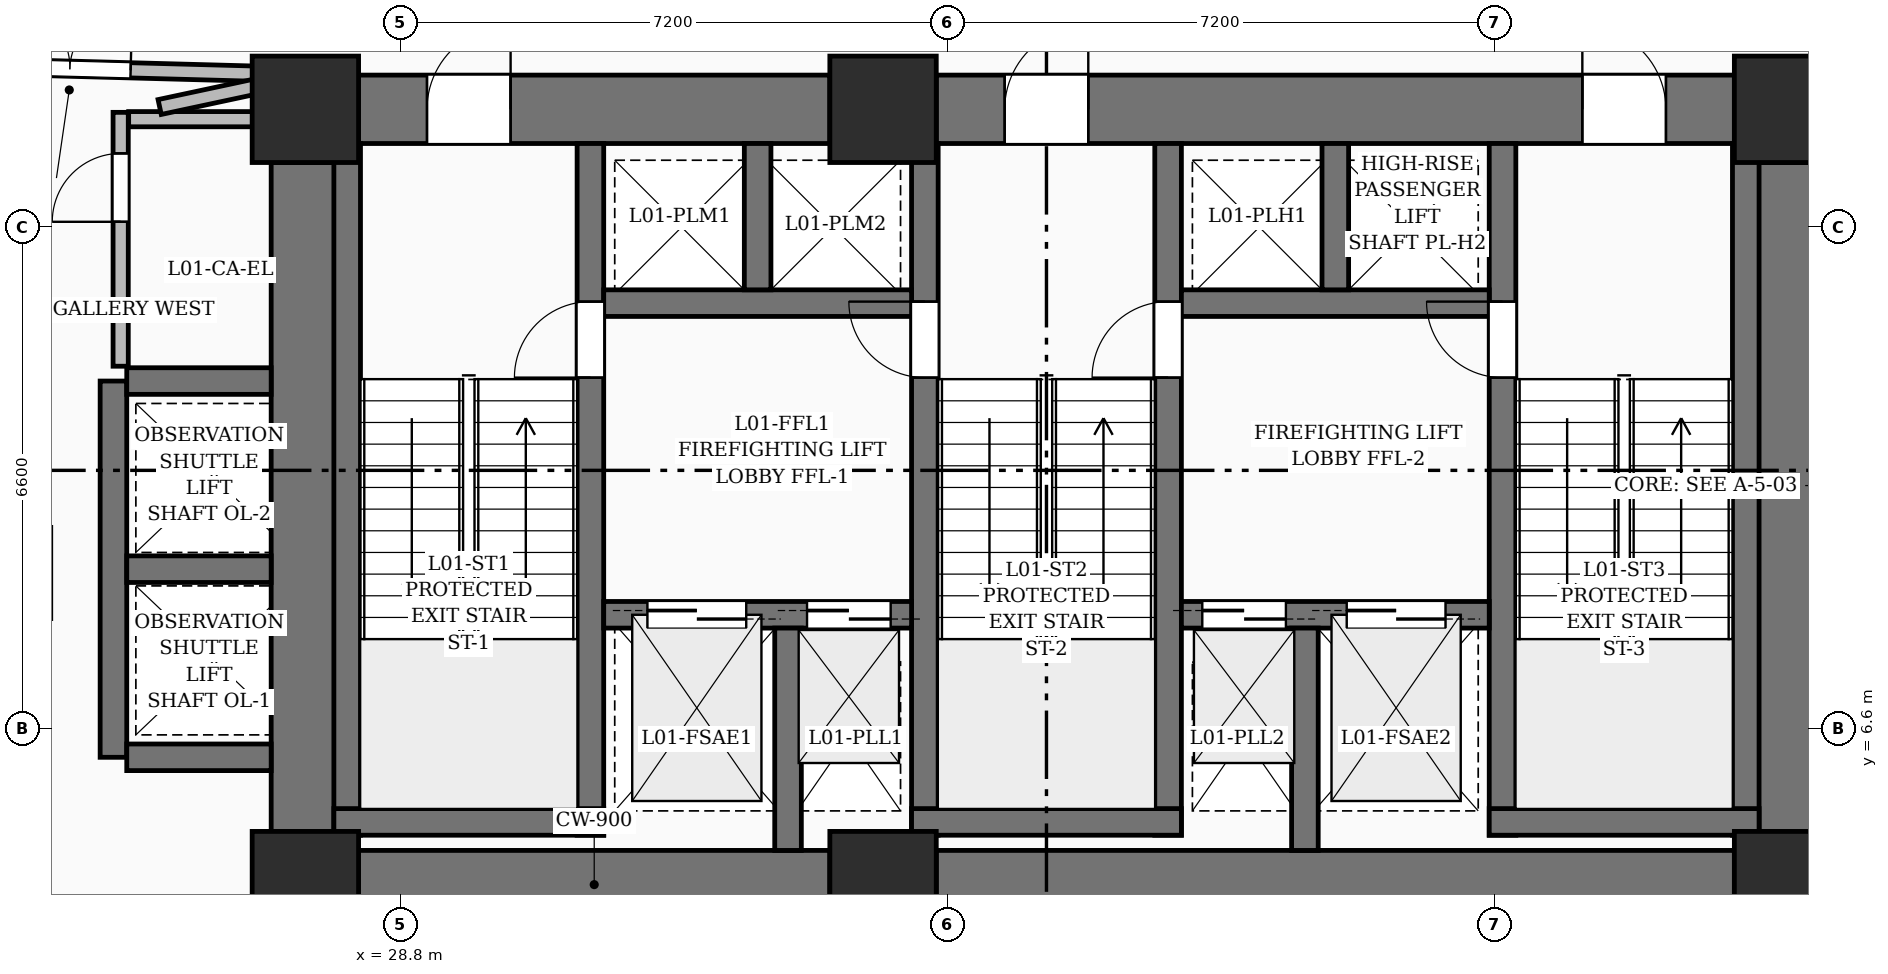
"""IFC4 building model, lengths in metres.
Left out: names, types, materials, properties, quantities, classifications, styles, units other than length and angle.
Written with IfcOpenShell. Run it as: python <this file> out.ifc"""

import sys

from ifc_helpers import new_model, si_unit, direction, frame, frame_2d, origin, origin_2d, place, context, subcontext, project, spatial, rectangle, extrude, element, fill, save


model = new_model("IFC4")
c1 = context("Model", 3, precision=1e-05, world=origin(), true_north=direction((0.0, 1.0)))
c2 = subcontext(c1, "Body", "Model", "MODEL_VIEW")
j1 = project(units=[si_unit("LENGTHUNIT", "METRE"), si_unit("PLANEANGLEUNIT", "RADIAN")], contexts=[c1])
p1 = place(None, origin())
s1 = spatial("IfcSite", under=j1, at=p1, CompositionType="ELEMENT")
p2 = place(p1, origin())
s2 = spatial("IfcBuilding", under=s1, at=p2, CompositionType="ELEMENT")
p3 = place(p2, frame((0.0, 0.0, 8.4)))
s3 = spatial("IfcBuildingStorey", under=s2, at=p3, CompositionType="ELEMENT", Elevation=8.4)
for number, where, z_axis, x_axis in (
    (1, (27.55, 4.55, 0.0), (0.0, 0.0, 1.0), (1.0, 0.0, 0.0)),
    (2, (35.15, 4.55, 0.0), (0.0, 0.0, 1.0), (1.0, 0.0, 0.0)),
    (3, (47.05, 4.55, 0.0), (0.0, 0.0, 1.0), (1.0, 0.0, 0.0)),
    (4, (27.55, 14.75, 0.0), (0.0, 0.0, 1.0), (1.0, 0.0, 0.0)),
    (5, (35.15, 14.75, 0.0), (0.0, 0.0, 1.0), (1.0, 0.0, 0.0)),
    (6, (47.05, 14.75, 0.0), (0.0, 0.0, 1.0), (1.0, 0.0, 0.0)),
):
    element("IfcColumn", number, at=place(p3, frame(where, z_axis=z_axis, x_axis=x_axis)), inside=s3, PredefinedType="COLUMN", context=c2, shape_type="SweptSolid", body=[
        extrude(rectangle(XDim=1.4, YDim=1.4, at=origin_2d()), origin(), (0.0, 0.0, 1.0), 4.5),
    ])
p4 = place(p3, frame((28.25, 4.55, 0.0), z_axis=(0.0, 0.0, 1.0), x_axis=(1.0, 0.0, 0.0)))
e7 = element("IfcWall", 7, at=p4, inside=s3, PredefinedType="SHEAR", context=c2, shape_type="SweptSolid", body=[
    extrude(rectangle(XDim=6.2, YDim=0.9, at=frame_2d((3.1, 0.0))), origin(), (0.0, 0.0, 1.0), 4.5),
])
p5 = place(p3, frame((35.85, 4.55, 0.0), z_axis=(0.0, 0.0, 1.0), x_axis=(1.0, 0.0, 0.0)))
e8 = element("IfcWall", 8, at=p5, inside=s3, PredefinedType="SHEAR", context=c2, shape_type="SweptSolid", body=[
    extrude(rectangle(XDim=10.5, YDim=0.9, at=frame_2d((5.25, 0.0))), origin(), (0.0, 0.0, 1.0), 4.5),
])
p6 = place(p3, frame((28.25, 14.75, 0.0), z_axis=(0.0, 0.0, 1.0), x_axis=(1.0, 0.0, 0.0)))
e9 = element("IfcWall", 9, at=p6, inside=s3, PredefinedType="SHEAR", context=c2, shape_type="SweptSolid", body=[
    extrude(rectangle(XDim=6.2, YDim=0.9, at=frame_2d((3.1, 0.0))), origin(), (0.0, 0.0, 1.0), 4.5),
])
p7 = place(p6, frame((0.9, 0.0, 0.0)))
e10 = element("IfcOpeningElement", 10, at=p7, cuts=e9, PredefinedType="OPENING", context=c2, shape_type="SweptSolid", body=[
    extrude(rectangle(XDim=1.1, YDim=2.2, at=frame_2d((0.55, 1.1))), frame((0.0, 0.46, 0.0), z_axis=(0.0, -1.0, 0.0), x_axis=(1.0, 0.0, 0.0)), (0.0, 0.0, 1.0), 0.92),
])
p8 = place(p3, frame((35.85, 14.75, 0.0), z_axis=(0.0, 0.0, 1.0), x_axis=(1.0, 0.0, 0.0)))
e11 = element("IfcWall", 11, at=p8, inside=s3, PredefinedType="SHEAR", context=c2, shape_type="SweptSolid", body=[
    extrude(rectangle(XDim=10.5, YDim=0.9, at=frame_2d((5.25, 0.0))), origin(), (0.0, 0.0, 1.0), 4.5),
])
p9 = place(p8, frame((0.9, 0.0, 0.0)))
e12 = element("IfcOpeningElement", 12, at=p9, cuts=e11, PredefinedType="OPENING", context=c2, shape_type="SweptSolid", body=[
    extrude(rectangle(XDim=1.1, YDim=2.2, at=frame_2d((0.55, 1.1))), frame((0.0, 0.46, 0.0), z_axis=(0.0, -1.0, 0.0), x_axis=(1.0, 0.0, 0.0)), (0.0, 0.0, 1.0), 0.92),
])
p10 = place(p8, frame((8.5, 0.0, 0.0)))
e13 = element("IfcOpeningElement", 13, at=p10, cuts=e11, PredefinedType="OPENING", context=c2, shape_type="SweptSolid", body=[
    extrude(rectangle(XDim=1.1, YDim=2.2, at=frame_2d((0.55, 1.1))), frame((0.0, 0.46, 0.0), z_axis=(0.0, -1.0, 0.0), x_axis=(1.0, 0.0, 0.0)), (0.0, 0.0, 1.0), 0.92),
])
for number, where, z_axis, x_axis in (
    (14, (27.55, 5.25, 0.0), (0.0, 0.0, 1.0), (0.0, 1.0, 0.0)),
    (15, (47.05, 5.25, 0.0), (0.0, 0.0, 1.0), (0.0, 1.0, 0.0)),
):
    element("IfcWall", number, at=place(p3, frame(where, z_axis=z_axis, x_axis=x_axis)), inside=s3, PredefinedType="SHEAR", context=c2, shape_type="SweptSolid", body=[
        extrude(rectangle(XDim=8.8, YDim=0.9, at=frame_2d((4.4, 0.0))), origin(), (0.0, 0.0, 1.0), 4.5),
    ])
p11 = place(p3, frame((28.1, 5.2, 0.0), z_axis=(0.0, 0.0, 1.0), x_axis=(0.0, 1.0, 0.0)))
e16 = element("IfcWall", 16, at=p11, inside=s3, PredefinedType="SOLIDWALL", context=c2, shape_type="SweptSolid", body=[
    extrude(rectangle(XDim=9.1, YDim=0.35, at=frame_2d((4.55, 0.0))), origin(), (0.0, 0.0, 1.0), 4.5),
])
p12 = place(p3, frame((31.3, 5.2, 0.0), z_axis=(0.0, 0.0, 1.0), x_axis=(0.0, 1.0, 0.0)))
e17 = element("IfcWall", 17, at=p12, inside=s3, PredefinedType="SOLIDWALL", context=c2, shape_type="SweptSolid", body=[
    extrude(rectangle(XDim=9.1, YDim=0.35, at=frame_2d((4.55, 0.0))), origin(), (0.0, 0.0, 1.0), 4.5),
])
p13 = place(p12, frame((6.02, 0.0, 0.0)))
e18 = element("IfcOpeningElement", 18, at=p13, cuts=e17, PredefinedType="OPENING", context=c2, shape_type="SweptSolid", body=[
    extrude(rectangle(XDim=1.0, YDim=2.15, at=frame_2d((0.5, 1.075))), frame((0.0, 0.185, 0.0), z_axis=(0.0, -1.0, 0.0), x_axis=(1.0, 0.0, 0.0)), (0.0, 0.0, 1.0), 0.37),
])
p14 = place(p3, frame((27.925, 5.375, 0.0), z_axis=(0.0, 0.0, 1.0), x_axis=(1.0, 0.0, 0.0)))
e19 = element("IfcWall", 19, at=p14, inside=s3, PredefinedType="SOLIDWALL", context=c2, shape_type="SweptSolid", body=[
    extrude(rectangle(XDim=3.55, YDim=0.35, at=frame_2d((1.775, 0.0))), origin(), (0.0, 0.0, 1.0), 4.5),
])
p15 = place(p3, frame((35.7, 5.2, 0.0), z_axis=(0.0, 0.0, 1.0), x_axis=(0.0, 1.0, 0.0)))
e20 = element("IfcWall", 20, at=p15, inside=s3, PredefinedType="SOLIDWALL", context=c2, shape_type="SweptSolid", body=[
    extrude(rectangle(XDim=9.1, YDim=0.35, at=frame_2d((4.55, 0.0))), origin(), (0.0, 0.0, 1.0), 4.5),
])
p16 = place(p15, frame((6.02, 0.0, 0.0)))
e21 = element("IfcOpeningElement", 21, at=p16, cuts=e20, PredefinedType="OPENING", context=c2, shape_type="SweptSolid", body=[
    extrude(rectangle(XDim=1.0, YDim=2.15, at=frame_2d((0.5, 1.075))), frame((0.0, 0.185, 0.0), z_axis=(0.0, -1.0, 0.0), x_axis=(1.0, 0.0, 0.0)), (0.0, 0.0, 1.0), 0.37),
])
p17 = place(p3, frame((38.9, 5.2, 0.0), z_axis=(0.0, 0.0, 1.0), x_axis=(0.0, 1.0, 0.0)))
e22 = element("IfcWall", 22, at=p17, inside=s3, PredefinedType="SOLIDWALL", context=c2, shape_type="SweptSolid", body=[
    extrude(rectangle(XDim=9.1, YDim=0.35, at=frame_2d((4.55, 0.0))), origin(), (0.0, 0.0, 1.0), 4.5),
])
p18 = place(p17, frame((6.02, 0.0, 0.0)))
e23 = element("IfcOpeningElement", 23, at=p18, cuts=e22, PredefinedType="OPENING", context=c2, shape_type="SweptSolid", body=[
    extrude(rectangle(XDim=1.0, YDim=2.15, at=frame_2d((0.5, 1.075))), frame((0.0, 0.185, 0.0), z_axis=(0.0, -1.0, 0.0), x_axis=(1.0, 0.0, 0.0)), (0.0, 0.0, 1.0), 0.37),
])
p19 = place(p3, frame((35.525, 5.375, 0.0), z_axis=(0.0, 0.0, 1.0), x_axis=(1.0, 0.0, 0.0)))
e24 = element("IfcWall", 24, at=p19, inside=s3, PredefinedType="SOLIDWALL", context=c2, shape_type="SweptSolid", body=[
    extrude(rectangle(XDim=3.55, YDim=0.35, at=frame_2d((1.775, 0.0))), origin(), (0.0, 0.0, 1.0), 4.5),
])
p20 = place(p3, frame((43.3, 5.2, 0.0), z_axis=(0.0, 0.0, 1.0), x_axis=(0.0, 1.0, 0.0)))
e25 = element("IfcWall", 25, at=p20, inside=s3, PredefinedType="SOLIDWALL", context=c2, shape_type="SweptSolid", body=[
    extrude(rectangle(XDim=9.1, YDim=0.35, at=frame_2d((4.55, 0.0))), origin(), (0.0, 0.0, 1.0), 4.5),
])
p21 = place(p20, frame((6.02, 0.0, 0.0)))
e26 = element("IfcOpeningElement", 26, at=p21, cuts=e25, PredefinedType="OPENING", context=c2, shape_type="SweptSolid", body=[
    extrude(rectangle(XDim=1.0, YDim=2.15, at=frame_2d((0.5, 1.075))), frame((0.0, 0.185, 0.0), z_axis=(0.0, -1.0, 0.0), x_axis=(1.0, 0.0, 0.0)), (0.0, 0.0, 1.0), 0.37),
])
p22 = place(p3, frame((46.5, 5.2, 0.0), z_axis=(0.0, 0.0, 1.0), x_axis=(0.0, 1.0, 0.0)))
e27 = element("IfcWall", 27, at=p22, inside=s3, PredefinedType="SOLIDWALL", context=c2, shape_type="SweptSolid", body=[
    extrude(rectangle(XDim=9.1, YDim=0.35, at=frame_2d((4.55, 0.0))), origin(), (0.0, 0.0, 1.0), 4.5),
])
p23 = place(p3, frame((43.125, 5.375, 0.0), z_axis=(0.0, 0.0, 1.0), x_axis=(1.0, 0.0, 0.0)))
e28 = element("IfcWall", 28, at=p23, inside=s3, PredefinedType="SOLIDWALL", context=c2, shape_type="SweptSolid", body=[
    extrude(rectangle(XDim=3.55, YDim=0.35, at=frame_2d((1.775, 0.0))), origin(), (0.0, 0.0, 1.0), 4.5),
])
p24 = place(p3, frame((31.475, 8.1, 0.0), z_axis=(0.0, 0.0, 1.0), x_axis=(1.0, 0.0, 0.0)))
e29 = element("IfcWall", 29, at=p24, inside=s3, PredefinedType="SOLIDWALL", context=c2, shape_type="SweptSolid", body=[
    extrude(rectangle(XDim=4.05, YDim=0.35, at=frame_2d((2.025, 0.0))), origin(), (0.0, 0.0, 1.0), 4.5),
])
p25 = place(p24, frame((0.575, 0.0, 0.0)))
e30 = element("IfcOpeningElement", 30, at=p25, cuts=e29, PredefinedType="OPENING", context=c2, shape_type="SweptSolid", body=[
    extrude(rectangle(XDim=1.3, YDim=2.25, at=frame_2d((0.65, 1.125))), frame((0.0, 0.185, 0.0), z_axis=(0.0, -1.0, 0.0), x_axis=(1.0, 0.0, 0.0)), (0.0, 0.0, 1.0), 0.37),
])
p26 = place(p24, frame((2.675, 0.0, 0.0)))
e31 = element("IfcOpeningElement", 31, at=p26, cuts=e29, PredefinedType="OPENING", context=c2, shape_type="SweptSolid", body=[
    extrude(rectangle(XDim=1.1, YDim=2.2, at=frame_2d((0.55, 1.1))), frame((0.0, 0.185, 0.0), z_axis=(0.0, -1.0, 0.0), x_axis=(1.0, 0.0, 0.0)), (0.0, 0.0, 1.0), 0.37),
])
p27 = place(p3, frame((39.075, 8.1, 0.0), z_axis=(0.0, 0.0, 1.0), x_axis=(1.0, 0.0, 0.0)))
e32 = element("IfcWall", 32, at=p27, inside=s3, PredefinedType="SOLIDWALL", context=c2, shape_type="SweptSolid", body=[
    extrude(rectangle(XDim=4.05, YDim=0.35, at=frame_2d((2.025, 0.0))), origin(), (0.0, 0.0, 1.0), 4.5),
])
p28 = place(p27, frame((2.175, 0.0, 0.0)))
e33 = element("IfcOpeningElement", 33, at=p28, cuts=e32, PredefinedType="OPENING", context=c2, shape_type="SweptSolid", body=[
    extrude(rectangle(XDim=1.3, YDim=2.25, at=frame_2d((0.65, 1.125))), frame((0.0, 0.185, 0.0), z_axis=(0.0, -1.0, 0.0), x_axis=(1.0, 0.0, 0.0)), (0.0, 0.0, 1.0), 0.37),
])
p29 = place(p27, frame((0.275, 0.0, 0.0)))
e34 = element("IfcOpeningElement", 34, at=p29, cuts=e32, PredefinedType="OPENING", context=c2, shape_type="SweptSolid", body=[
    extrude(rectangle(XDim=1.1, YDim=2.2, at=frame_2d((0.55, 1.1))), frame((0.0, 0.185, 0.0), z_axis=(0.0, -1.0, 0.0), x_axis=(1.0, 0.0, 0.0)), (0.0, 0.0, 1.0), 0.37),
])
for number, where, z_axis, x_axis in (
    (35, (33.9, 5.0, 0.0), (0.0, 0.0, 1.0), (0.0, 1.0, 0.0)),
    (36, (40.7, 5.0, 0.0), (0.0, 0.0, 1.0), (0.0, 1.0, 0.0)),
):
    element("IfcWall", number, at=place(p3, frame(where, z_axis=z_axis, x_axis=x_axis)), inside=s3, PredefinedType="SOLIDWALL", context=c2, shape_type="SweptSolid", body=[
        extrude(rectangle(XDim=2.925, YDim=0.35, at=frame_2d((1.462, 0.0))), origin(), (0.0, 0.0, 1.0), 4.5),
    ])
p30 = place(p3, frame((31.475, 12.2, 0.0), z_axis=(0.0, 0.0, 1.0), x_axis=(1.0, 0.0, 0.0)))
e37 = element("IfcWall", 37, at=p30, inside=s3, PredefinedType="SOLIDWALL", context=c2, shape_type="SweptSolid", body=[
    extrude(rectangle(XDim=4.05, YDim=0.35, at=frame_2d((2.025, 0.0))), origin(), (0.0, 0.0, 1.0), 4.5),
])
p31 = place(p3, frame((33.5, 12.375, 0.0), z_axis=(0.0, 0.0, 1.0), x_axis=(0.0, 1.0, 0.0)))
e38 = element("IfcWall", 38, at=p31, inside=s3, PredefinedType="SOLIDWALL", context=c2, shape_type="SweptSolid", body=[
    extrude(rectangle(XDim=1.925, YDim=0.35, at=frame_2d((0.962, 0.0))), origin(), (0.0, 0.0, 1.0), 4.5),
])
p32 = place(p3, frame((39.075, 12.2, 0.0), z_axis=(0.0, 0.0, 1.0), x_axis=(1.0, 0.0, 0.0)))
e39 = element("IfcWall", 39, at=p32, inside=s3, PredefinedType="SOLIDWALL", context=c2, shape_type="SweptSolid", body=[
    extrude(rectangle(XDim=4.05, YDim=0.35, at=frame_2d((2.025, 0.0))), origin(), (0.0, 0.0, 1.0), 4.5),
])
p33 = place(p3, frame((41.1, 12.375, 0.0), z_axis=(0.0, 0.0, 1.0), x_axis=(0.0, 1.0, 0.0)))
e40 = element("IfcWall", 40, at=p33, inside=s3, PredefinedType="SOLIDWALL", context=c2, shape_type="SweptSolid", body=[
    extrude(rectangle(XDim=1.925, YDim=0.35, at=frame_2d((0.962, 0.0))), origin(), (0.0, 0.0, 1.0), 4.5),
])
p34 = place(p3, frame((25.025, 6.225, 0.0), z_axis=(0.0, 0.0, 1.0), x_axis=(0.0, 1.0, 0.0)))
e41 = element("IfcWall", 41, at=p34, inside=s3, PredefinedType="SOLIDWALL", context=c2, shape_type="SweptSolid", body=[
    extrude(rectangle(XDim=4.95, YDim=0.35, at=frame_2d((2.475, 0.0))), origin(), (0.0, 0.0, 1.0), 4.5),
])
for number, where, z_axis, x_axis in (
    (42, (25.2, 6.225, 0.0), (0.0, 0.0, 1.0), (1.0, 0.0, 0.0)),
    (43, (25.2, 8.7, 0.0), (0.0, 0.0, 1.0), (1.0, 0.0, 0.0)),
    (44, (25.2, 11.175, 0.0), (0.0, 0.0, 1.0), (1.0, 0.0, 0.0)),
):
    element("IfcWall", number, at=place(p3, frame(where, z_axis=z_axis, x_axis=x_axis)), inside=s3, PredefinedType="SOLIDWALL", context=c2, shape_type="SweptSolid", body=[
        extrude(rectangle(XDim=1.9, YDim=0.35, at=frame_2d((0.95, 0.0))), origin(), (0.0, 0.0, 1.0), 4.5),
    ])
p35 = place(p3, frame((25.12, 11.37, 0.0), z_axis=(0.0, 0.0, 1.0), x_axis=(0.0, 1.0, 0.0)))
e45 = element("IfcWall", 45, at=p35, inside=s3, PredefinedType="PARTITIONING", context=c2, shape_type="SweptSolid", body=[
    extrude(rectangle(XDim=3.34, YDim=0.2, at=frame_2d((1.67, 0.0))), origin(), (0.0, 0.0, 1.0), 4.2),
])
p36 = place(p35, frame((1.9, 0.0, 0.0)))
e46 = element("IfcOpeningElement", 46, at=p36, cuts=e45, PredefinedType="OPENING", context=c2, shape_type="SweptSolid", body=[
    extrude(rectangle(XDim=0.9, YDim=2.1, at=frame_2d((0.45, 1.05))), frame((0.0, 0.11, 0.0), z_axis=(0.0, -1.0, 0.0), x_axis=(1.0, 0.0, 0.0)), (0.0, 0.0, 1.0), 0.22),
])
p37 = place(p3, frame((25.225, 14.62, 0.0), z_axis=(0.0, 0.0, 1.0), x_axis=(1.0, 0.0, 0.0)))
e47 = element("IfcWall", 47, at=p37, inside=s3, PredefinedType="PARTITIONING", context=c2, shape_type="SweptSolid", body=[
    extrude(rectangle(XDim=1.86, YDim=0.2, at=frame_2d((0.93, 0.0))), origin(), (0.0, 0.0, 1.0), 4.2),
])
p38 = place(p3, frame((22.0, 15.35, 0.0), z_axis=(0.0, 0.0, 1.0), x_axis=(0.999640767954, -0.02680177314, 0.0)))
e48 = element("IfcWall", 48, at=p38, inside=s3, PredefinedType="PARTITIONING", context=c2, shape_type="SweptSolid", body=[
    extrude(rectangle(XDim=5.602, YDim=0.2, at=frame_2d((2.801, 0.0))), origin(), (0.0, 0.0, 1.0), 3.078),
])
p39 = place(p38, frame((1.652, 0.0, 0.0)))
e49 = element("IfcOpeningElement", 49, at=p39, cuts=e48, PredefinedType="OPENING", context=c2, shape_type="SweptSolid", body=[
    extrude(rectangle(XDim=1.6, YDim=2.3, at=frame_2d((0.8, 1.15))), frame((0.0, 0.11, 0.0), z_axis=(0.0, -1.0, 0.0), x_axis=(1.0, 0.0, 0.0)), (0.0, 0.0, 1.0), 0.22),
])
p40 = place(p3, frame((25.633, 14.78, 0.0), z_axis=(0.0, 0.0, 1.0), x_axis=(0.977912383678, 0.20901523832, 0.0)))
e50 = element("IfcWall", 50, at=p40, inside=s3, PredefinedType="PARTITIONING", context=c2, shape_type="SweptSolid", body=[
    extrude(rectangle(XDim=1.33, YDim=0.2, at=frame_2d((0.665, 0.0))), origin(), (0.0, 0.0, 1.0), 3.078),
])
p41 = place(p7, origin())
e51 = element("IfcDoor", 51, at=p41, inside=s3, OperationType="SINGLE_SWING_RIGHT", PredefinedType="DOOR", context=c2, shape_type="SweptSolid", body=[
    extrude(rectangle(XDim=1.1, YDim=2.2, at=frame_2d((0.55, 1.1))), frame((0.0, 0.025, 0.0), z_axis=(0.0, -1.0, 0.0), x_axis=(1.0, 0.0, 0.0)), (0.0, 0.0, 1.0), 0.05),
])
fill(e10, e51)
p42 = place(p9, origin())
e52 = element("IfcDoor", 52, at=p42, inside=s3, OperationType="SINGLE_SWING_RIGHT", PredefinedType="DOOR", context=c2, shape_type="SweptSolid", body=[
    extrude(rectangle(XDim=1.1, YDim=2.2, at=frame_2d((0.55, 1.1))), frame((0.0, 0.025, 0.0), z_axis=(0.0, -1.0, 0.0), x_axis=(1.0, 0.0, 0.0)), (0.0, 0.0, 1.0), 0.05),
])
fill(e12, e52)
p43 = place(p10, origin())
e53 = element("IfcDoor", 53, at=p43, inside=s3, OperationType="SINGLE_SWING_LEFT", PredefinedType="DOOR", context=c2, shape_type="SweptSolid", body=[
    extrude(rectangle(XDim=1.1, YDim=2.2, at=frame_2d((0.55, 1.1))), frame((0.0, 0.025, 0.0), z_axis=(0.0, -1.0, 0.0), x_axis=(1.0, 0.0, 0.0)), (0.0, 0.0, 1.0), 0.05),
])
fill(e13, e53)
p44 = place(p13, origin())
e54 = element("IfcDoor", 54, at=p44, inside=s3, OperationType="SINGLE_SWING_LEFT", PredefinedType="DOOR", context=c2, shape_type="SweptSolid", body=[
    extrude(rectangle(XDim=1.0, YDim=2.15, at=frame_2d((0.5, 1.075))), frame((0.0, 0.025, 0.0), z_axis=(0.0, -1.0, 0.0), x_axis=(1.0, 0.0, 0.0)), (0.0, 0.0, 1.0), 0.05),
])
fill(e18, e54)
p45 = place(p16, origin())
e55 = element("IfcDoor", 55, at=p45, inside=s3, OperationType="SINGLE_SWING_RIGHT", PredefinedType="DOOR", context=c2, shape_type="SweptSolid", body=[
    extrude(rectangle(XDim=1.0, YDim=2.15, at=frame_2d((0.5, 1.075))), frame((0.0, 0.025, 0.0), z_axis=(0.0, -1.0, 0.0), x_axis=(1.0, 0.0, 0.0)), (0.0, 0.0, 1.0), 0.05),
])
fill(e21, e55)
p46 = place(p18, origin())
e56 = element("IfcDoor", 56, at=p46, inside=s3, OperationType="SINGLE_SWING_LEFT", PredefinedType="DOOR", context=c2, shape_type="SweptSolid", body=[
    extrude(rectangle(XDim=1.0, YDim=2.15, at=frame_2d((0.5, 1.075))), frame((0.0, 0.025, 0.0), z_axis=(0.0, -1.0, 0.0), x_axis=(1.0, 0.0, 0.0)), (0.0, 0.0, 1.0), 0.05),
])
fill(e23, e56)
p47 = place(p21, origin())
e57 = element("IfcDoor", 57, at=p47, inside=s3, OperationType="SINGLE_SWING_RIGHT", PredefinedType="DOOR", context=c2, shape_type="SweptSolid", body=[
    extrude(rectangle(XDim=1.0, YDim=2.15, at=frame_2d((0.5, 1.075))), frame((0.0, 0.025, 0.0), z_axis=(0.0, -1.0, 0.0), x_axis=(1.0, 0.0, 0.0)), (0.0, 0.0, 1.0), 0.05),
])
fill(e26, e57)
p48 = place(p25, origin())
e58 = element("IfcDoor", 58, at=p48, inside=s3, OperationType="DOUBLE_DOOR_SLIDING", PredefinedType="DOOR", context=c2, shape_type="SweptSolid", body=[
    extrude(rectangle(XDim=1.3, YDim=2.25, at=frame_2d((0.65, 1.125))), frame((0.0, 0.025, 0.0), z_axis=(0.0, -1.0, 0.0), x_axis=(1.0, 0.0, 0.0)), (0.0, 0.0, 1.0), 0.05),
])
fill(e30, e58)
p49 = place(p28, origin())
e59 = element("IfcDoor", 59, at=p49, inside=s3, OperationType="DOUBLE_DOOR_SLIDING", PredefinedType="DOOR", context=c2, shape_type="SweptSolid", body=[
    extrude(rectangle(XDim=1.3, YDim=2.25, at=frame_2d((0.65, 1.125))), frame((0.0, 0.025, 0.0), z_axis=(0.0, -1.0, 0.0), x_axis=(1.0, 0.0, 0.0)), (0.0, 0.0, 1.0), 0.05),
])
fill(e33, e59)
p50 = place(p26, origin())
e60 = element("IfcDoor", 60, at=p50, inside=s3, OperationType="DOUBLE_DOOR_SLIDING", PredefinedType="DOOR", context=c2, shape_type="SweptSolid", body=[
    extrude(rectangle(XDim=1.1, YDim=2.2, at=frame_2d((0.55, 1.1))), frame((0.0, 0.025, 0.0), z_axis=(0.0, -1.0, 0.0), x_axis=(1.0, 0.0, 0.0)), (0.0, 0.0, 1.0), 0.05),
])
fill(e31, e60)
p51 = place(p29, origin())
e61 = element("IfcDoor", 61, at=p51, inside=s3, OperationType="DOUBLE_DOOR_SLIDING", PredefinedType="DOOR", context=c2, shape_type="SweptSolid", body=[
    extrude(rectangle(XDim=1.1, YDim=2.2, at=frame_2d((0.55, 1.1))), frame((0.0, 0.025, 0.0), z_axis=(0.0, -1.0, 0.0), x_axis=(1.0, 0.0, 0.0)), (0.0, 0.0, 1.0), 0.05),
])
fill(e34, e61)
p52 = place(p36, origin())
e62 = element("IfcDoor", 62, at=p52, inside=s3, OperationType="SINGLE_SWING_LEFT", PredefinedType="DOOR", context=c2, shape_type="SweptSolid", body=[
    extrude(rectangle(XDim=0.9, YDim=2.1, at=frame_2d((0.45, 1.05))), frame((0.0, 0.025, 0.0), z_axis=(0.0, -1.0, 0.0), x_axis=(1.0, 0.0, 0.0)), (0.0, 0.0, 1.0), 0.05),
])
fill(e46, e62)
p53 = place(p39, origin())
e63 = element("IfcDoor", 63, at=p53, inside=s3, OperationType="DOUBLE_DOOR_SINGLE_SWING", PredefinedType="DOOR", context=c2, shape_type="SweptSolid", body=[
    extrude(rectangle(XDim=1.6, YDim=2.3, at=frame_2d((0.8, 1.15))), frame((0.0, 0.025, 0.0), z_axis=(0.0, -1.0, 0.0), x_axis=(1.0, 0.0, 0.0)), (0.0, 0.0, 1.0), 0.05),
])
fill(e49, e63)
save(model, sys.argv[1])
